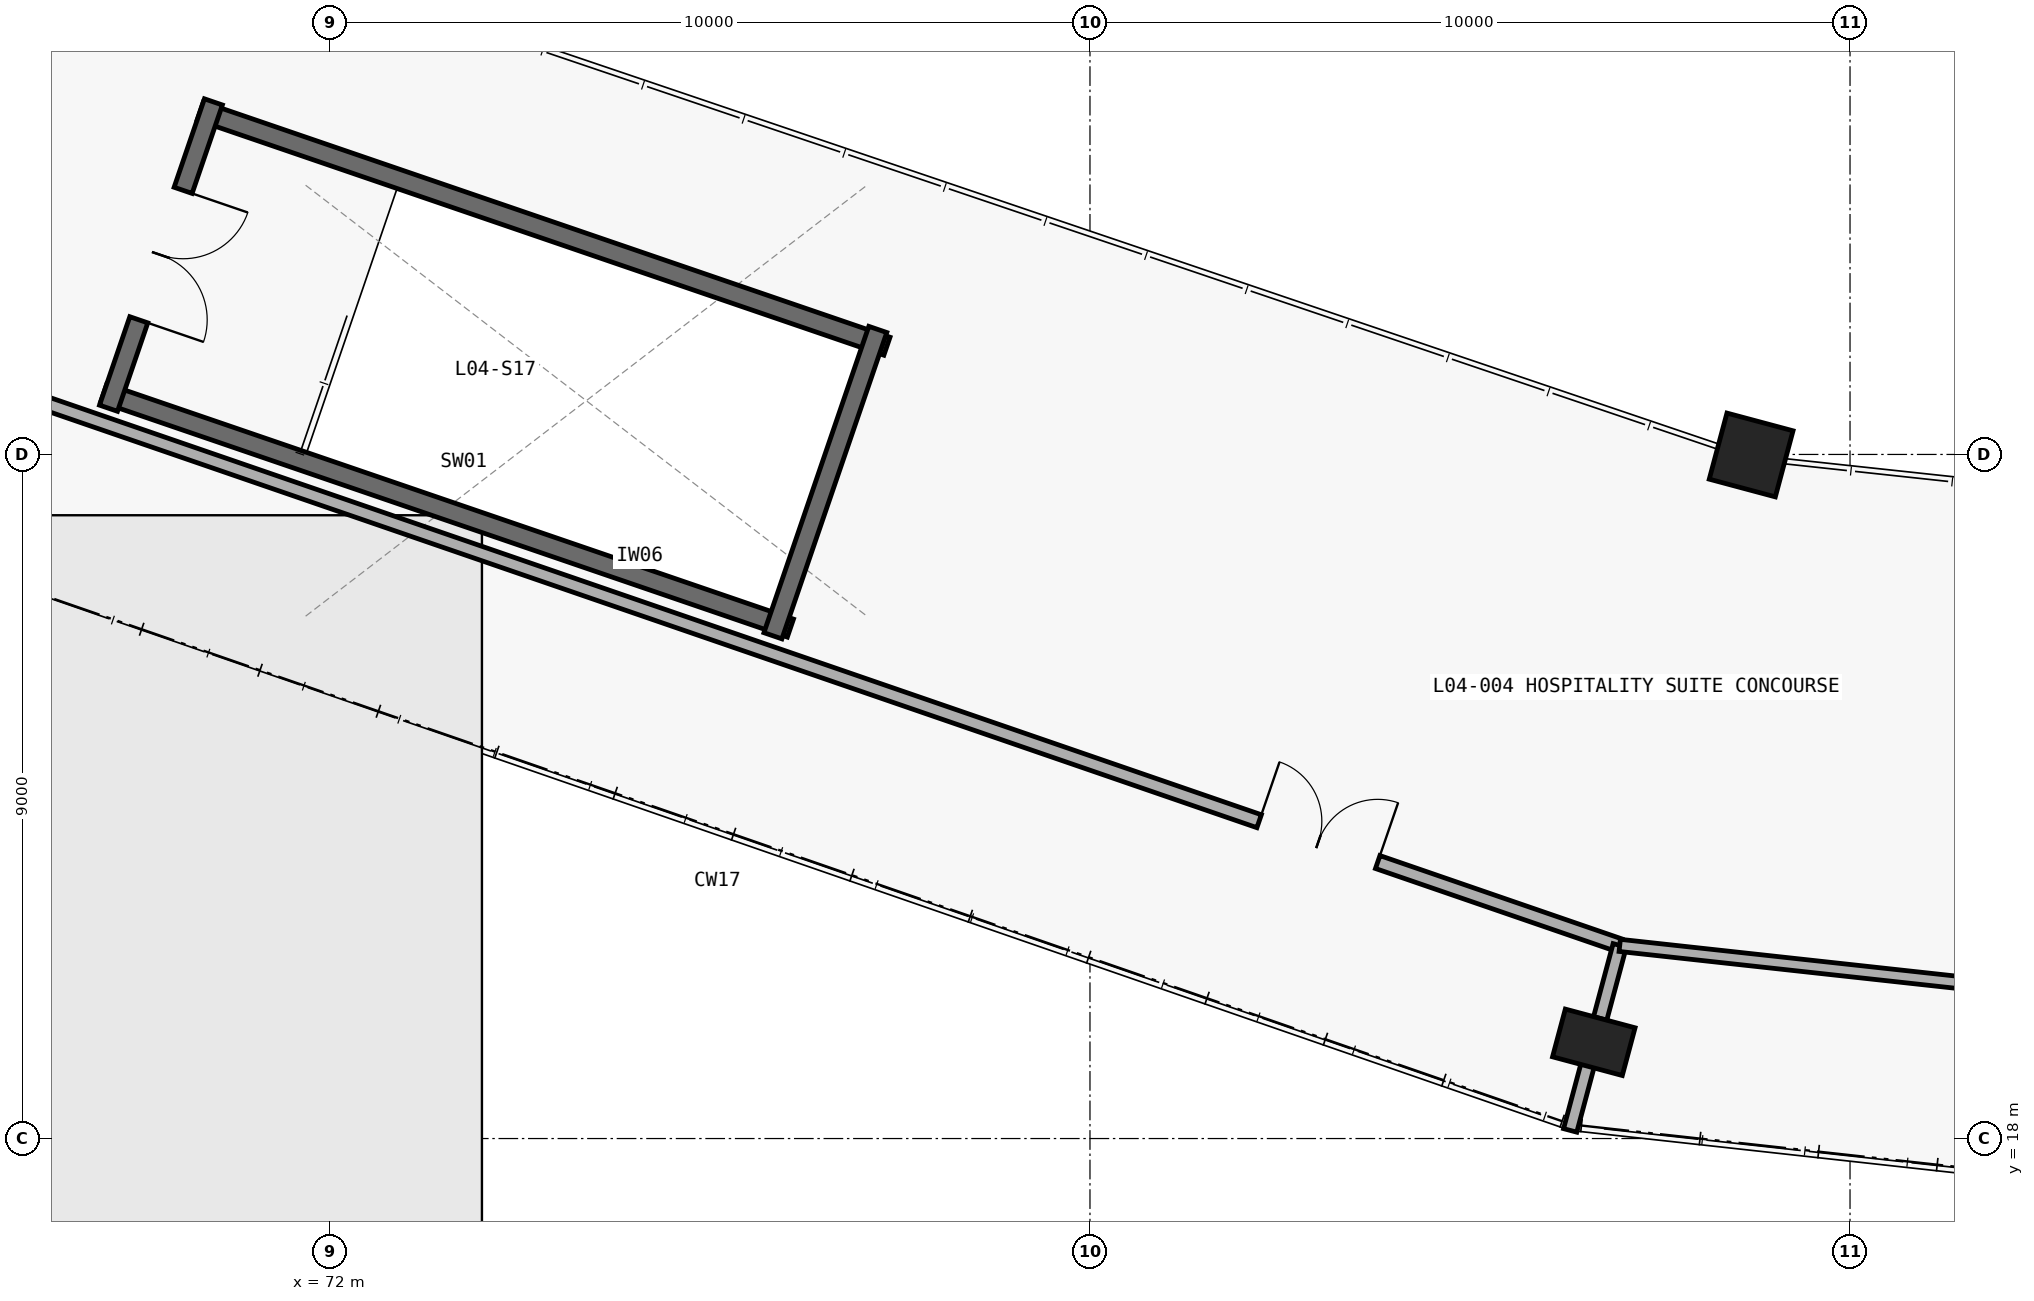
"""IFC4 building model, lengths in metres.
Left out: names, types, materials, properties, quantities, classifications, styles, units other than length and angle.
Written with IfcOpenShell. Run it as: python <this file> out.ifc"""

import sys

from ifc_helpers import new_model, si_unit, direction, frame, frame_2d, origin, origin_2d, place, context, subcontext, project, spatial, rectangle, extrude, element, fill, save


model = new_model("IFC4")
c1 = context("Model", 3, precision=1e-05, world=origin(), true_north=direction((0.0, 1.0)))
c2 = subcontext(c1, "Body", "Model", "MODEL_VIEW")
j1 = project(units=[si_unit("LENGTHUNIT", "METRE"), si_unit("PLANEANGLEUNIT", "RADIAN")], contexts=[c1])
p1 = place(None, origin())
s1 = spatial("IfcSite", under=j1, at=p1, CompositionType="ELEMENT")
p2 = place(p1, origin())
s2 = spatial("IfcBuilding", under=s1, at=p2, CompositionType="ELEMENT")
p3 = place(p2, frame((0.0, 0.0, 19.8)))
s3 = spatial("IfcBuildingStorey", under=s2, at=p3, CompositionType="ELEMENT", Elevation=19.8)
p4 = place(p3, frame((88.629, 19.266, 0.0), z_axis=(0.0, 0.0, 1.0), x_axis=(0.258819045103, 0.965925826289, 0.0)))
e1 = element("IfcColumn", 1, at=p4, inside=s3, PredefinedType="COLUMN", context=c2, shape_type="SweptSolid", body=[
    extrude(rectangle(XDim=0.65, YDim=0.95, at=origin_2d()), origin(), (0.0, 0.0, 1.0), 4.8),
])
p5 = place(p3, frame((90.699, 26.993, 0.0), z_axis=(0.0, 0.0, 1.0), x_axis=(0.258819045103, 0.965925826289, 0.0)))
e2 = element("IfcColumn", 2, at=p5, inside=s3, PredefinedType="COLUMN", context=c2, shape_type="SweptSolid", body=[
    extrude(rectangle(XDim=0.9, YDim=0.9, at=origin_2d()), origin(), (0.0, 0.0, 1.0), 4.8),
])
for number, where, z_axis, x_axis in (
    (3, (69.024, 27.809, 0.0), (0.0, 0.0, 1.0), (0.946, -0.324, 0.0)),
    (4, (79.328, 28.424, 0.0), (0.0, 0.0, 1.0), (-0.946, 0.324, 0.0)),
):
    element("IfcWall", number, at=place(p3, frame(where, z_axis=z_axis, x_axis=x_axis)), inside=s3, PredefinedType="SHEAR", context=c2, shape_type="SweptSolid", body=[
        extrude(rectangle(XDim=9.55, YDim=0.25, at=frame_2d((4.775, 0.0))), origin(), (0.0, 0.0, 1.0), 4.54),
    ])
p6 = place(p3, frame((70.467, 31.638, 0.0), z_axis=(0.0, 0.0, 1.0), x_axis=(-0.323971192516, -0.946066946056, 0.0)))
e5 = element("IfcWall", 5, at=p6, inside=s3, PredefinedType="SHEAR", context=c2, shape_type="SweptSolid", body=[
    extrude(rectangle(XDim=4.26, YDim=0.25, at=frame_2d((2.13, 0.0))), origin(), (0.0, 0.0, 1.0), 4.54),
])
p7 = place(p6, frame((1.23, 0.0, 0.0)))
e6 = element("IfcOpeningElement", 6, at=p7, cuts=e5, PredefinedType="OPENING", context=c2, shape_type="SweptSolid", body=[
    extrude(rectangle(XDim=1.8, YDim=2.25, at=frame_2d((0.9, 1.125))), frame((0.0, 0.135, 0.0), z_axis=(0.0, -1.0, 0.0), x_axis=(1.0, 0.0, 0.0)), (0.0, 0.0, 1.0), 0.27),
])
p8 = place(p3, frame((77.828, 24.615, 0.0), z_axis=(0.0, 0.0, 1.0), x_axis=(0.323971192516, 0.946066946056, 0.0)))
e7 = element("IfcWall", 7, at=p8, inside=s3, PredefinedType="SHEAR", context=c2, shape_type="SweptSolid", body=[
    extrude(rectangle(XDim=4.26, YDim=0.25, at=frame_2d((2.13, 0.0))), origin(), (0.0, 0.0, 1.0), 4.54),
])
p9 = place(p3, frame((67.51, 27.931, 0.0), z_axis=(0.0, 0.0, 1.0), x_axis=(0.945509956828, -0.32559318411, 0.0)))
e8 = element("IfcWall", 8, at=p9, inside=s3, PredefinedType="PARTITIONING", context=c2, shape_type="SweptSolid", body=[
    extrude(rectangle(XDim=22.697, YDim=0.18, at=frame_2d((11.348, 0.0))), origin(), (0.0, 0.0, 1.0), 3.665),
])
p10 = place(p9, frame((17.679, 0.0, 0.0)))
e9 = element("IfcOpeningElement", 9, at=p10, cuts=e8, PredefinedType="OPENING", context=c2, shape_type="SweptSolid", body=[
    extrude(rectangle(XDim=1.65, YDim=2.25, at=frame_2d((0.825, 1.125))), frame((0.0, 0.1, 0.0), z_axis=(0.0, -1.0, 0.0), x_axis=(1.0, 0.0, 0.0)), (0.0, 0.0, 1.0), 0.2),
])
p11 = place(p3, frame((88.97, 20.541, 0.0), z_axis=(0.0, 0.0, 1.0), x_axis=(-0.258550707932, -0.965997687072, 0.0)))
e10 = element("IfcWall", 10, at=p11, inside=s3, PredefinedType="PARTITIONING", context=c2, shape_type="SweptSolid", body=[
    extrude(rectangle(XDim=1.01, YDim=0.18, at=frame_2d((0.505, 0.0))), origin(), (0.0, 0.0, 1.0), 3.665),
])
p12 = place(p3, frame((88.712, 19.581, 0.0), z_axis=(0.0, 0.0, 1.0), x_axis=(-0.25809085904, -0.966120649029, 0.0)))
e11 = element("IfcWall", 11, at=p12, inside=s3, PredefinedType="PARTITIONING", context=c2, shape_type="SweptSolid", body=[
    extrude(rectangle(XDim=1.526, YDim=0.18, at=frame_2d((0.763, 0.0))), origin(), (0.0, 0.0, 1.0), 3.665),
])
p13 = place(p3, frame((88.97, 20.541, 0.0), z_axis=(0.0, 0.0, 1.0), x_axis=(0.994061953131, -0.108815593262, 0.0)))
e12 = element("IfcWall", 12, at=p13, inside=s3, PredefinedType="PARTITIONING", context=c2, shape_type="SweptSolid", body=[
    extrude(rectangle(XDim=23.167, YDim=0.16, at=frame_2d((11.584, 0.0))), origin(), (0.0, 0.0, 1.0), 3.665),
])
p14 = place(p13, frame((10.709, 0.0, 0.0)))
e13 = element("IfcOpeningElement", 13, at=p14, cuts=e12, PredefinedType="OPENING", context=c2, shape_type="SweptSolid", body=[
    extrude(rectangle(XDim=1.75, YDim=2.3, at=frame_2d((0.875, 1.15))), frame((0.0, 0.09, 0.0), z_axis=(0.0, -1.0, 0.0), x_axis=(1.0, 0.0, 0.0)), (0.0, 0.0, 1.0), 0.18),
])
p15 = place(p7, origin())
e14 = element("IfcDoor", 14, at=p15, inside=s3, OperationType="DOUBLE_DOOR_SINGLE_SWING", PredefinedType="DOOR", context=c2, shape_type="SweptSolid", body=[
    extrude(rectangle(XDim=1.8, YDim=2.25, at=frame_2d((0.9, 1.125))), frame((0.0, 0.025, 0.0), z_axis=(0.0, -1.0, 0.0), x_axis=(1.0, 0.0, 0.0)), (0.0, 0.0, 1.0), 0.05),
])
fill(e6, e14)
p16 = place(p10, origin())
e15 = element("IfcDoor", 15, at=p16, inside=s3, OperationType="DOUBLE_DOOR_SINGLE_SWING", PredefinedType="DOOR", context=c2, shape_type="SweptSolid", body=[
    extrude(rectangle(XDim=1.65, YDim=2.25, at=frame_2d((0.825, 1.125))), frame((0.0, 0.025, 0.0), z_axis=(0.0, -1.0, 0.0), x_axis=(1.0, 0.0, 0.0)), (0.0, 0.0, 1.0), 0.05),
])
fill(e9, e15)
save(model, sys.argv[1])
